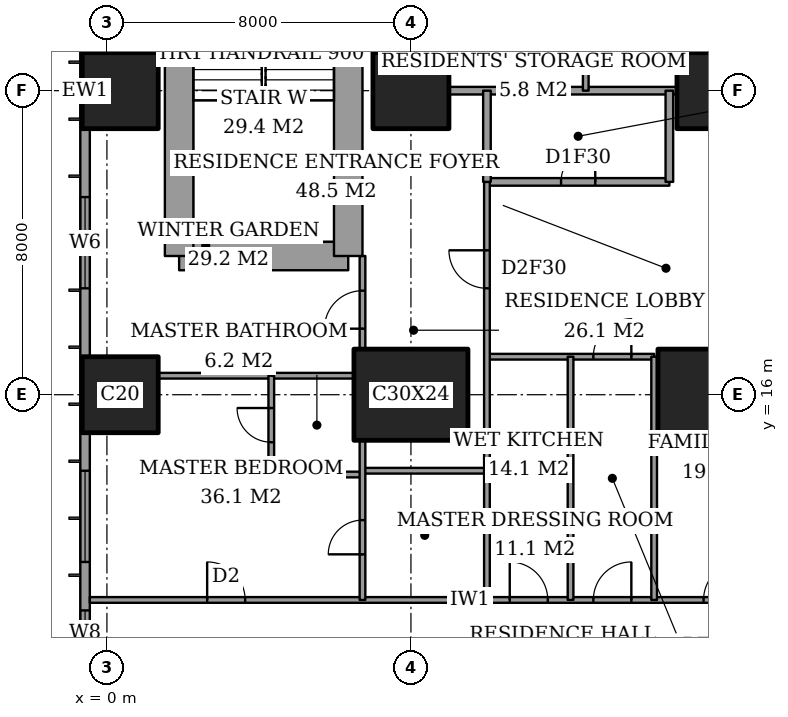
"""IFC4 building model, lengths in metres.
Left out: names, types, materials, properties, quantities, classifications, styles, units other than length and angle.
Written with IfcOpenShell. Run it as: python <this file> out.ifc"""

import sys

from ifc_helpers import new_model, si_unit, direction, frame, frame_2d, origin, origin_2d, place, context, subcontext, project, spatial, rectangle, extrude, element, fill, save


model = new_model("IFC4")
c1 = context("Model", 3, precision=1e-05, world=origin(), true_north=direction((0.0, 1.0)))
c2 = subcontext(c1, "Body", "Model", "MODEL_VIEW")
j1 = project(units=[si_unit("LENGTHUNIT", "METRE"), si_unit("PLANEANGLEUNIT", "RADIAN")], contexts=[c1])
p1 = place(None, origin())
s1 = spatial("IfcSite", under=j1, at=p1, CompositionType="ELEMENT")
p2 = place(p1, origin())
s2 = spatial("IfcBuilding", under=s1, at=p2, CompositionType="ELEMENT")
p3 = place(p2, frame((0.0, 0.0, 36.8)))
s3 = spatial("IfcBuildingStorey", under=s2, at=p3, CompositionType="ELEMENT", Elevation=36.8)
for number, where, z_axis, x_axis in (
    (1, (0.35, 16.0, 0.0), (0.0, 0.0, 1.0), (1.0, 0.0, 0.0)),
    (2, (0.35, 24.0, 0.0), (0.0, 0.0, 1.0), (1.0, 0.0, 0.0)),
):
    element("IfcColumn", number, at=place(p3, frame(where, z_axis=z_axis, x_axis=x_axis)), inside=s3, PredefinedType="COLUMN", context=c2, shape_type="SweptSolid", body=[
        extrude(rectangle(XDim=2.0, YDim=2.0, at=origin_2d()), origin(), (0.0, 0.0, 1.0), 3.6),
    ])
p4 = place(p3, frame((8.0, 16.0, 0.0), z_axis=(0.0, 0.0, 1.0), x_axis=(1.0, 0.0, 0.0)))
e3 = element("IfcColumn", 3, at=p4, inside=s3, PredefinedType="COLUMN", context=c2, shape_type="SweptSolid", body=[
    extrude(rectangle(XDim=3.0, YDim=2.4, at=origin_2d()), origin(), (0.0, 0.0, 1.0), 3.6),
])
p5 = place(p3, frame((8.0, 24.0, 0.0), z_axis=(0.0, 0.0, 1.0), x_axis=(1.0, 0.0, 0.0)))
e4 = element("IfcColumn", 4, at=p5, inside=s3, PredefinedType="COLUMN", context=c2, shape_type="SweptSolid", body=[
    extrude(rectangle(XDim=2.0, YDim=2.0, at=origin_2d()), origin(), (0.0, 0.0, 1.0), 3.6),
])
p6 = place(p3, frame((16.0, 16.0, 0.0), z_axis=(0.0, 0.0, 1.0), x_axis=(1.0, 0.0, 0.0)))
e5 = element("IfcColumn", 5, at=p6, inside=s3, PredefinedType="COLUMN", context=c2, shape_type="SweptSolid", body=[
    extrude(rectangle(XDim=3.0, YDim=2.4, at=origin_2d()), origin(), (0.0, 0.0, 1.0), 3.6),
])
p7 = place(p3, frame((16.0, 24.0, 0.0), z_axis=(0.0, 0.0, 1.0), x_axis=(1.0, 0.0, 0.0)))
e6 = element("IfcColumn", 6, at=p7, inside=s3, PredefinedType="COLUMN", context=c2, shape_type="SweptSolid", body=[
    extrude(rectangle(XDim=2.0, YDim=2.0, at=origin_2d()), origin(), (0.0, 0.0, 1.0), 3.6),
])
p8 = place(p3, frame((1.9, 19.65, 0.0), z_axis=(0.0, 0.0, 1.0), x_axis=(1.0, 0.0, 0.0)))
e7 = element("IfcWall", 7, at=p8, inside=s3, PredefinedType="SHEAR", context=c2, shape_type="SweptSolid", body=[
    extrude(rectangle(XDim=4.45, YDim=0.75, at=frame_2d((2.225, 0.0))), origin(), (0.0, 0.0, 1.0), 3.6),
])
p9 = place(p3, frame((6.35, 19.65, 0.0), z_axis=(0.0, 0.0, 1.0), x_axis=(0.0, 1.0, 0.0)))
e8 = element("IfcWall", 8, at=p9, inside=s3, PredefinedType="SHEAR", context=c2, shape_type="SweptSolid", body=[
    extrude(rectangle(XDim=8.7, YDim=0.75, at=frame_2d((4.35, 0.0))), origin(), (0.0, 0.0, 1.0), 3.6),
])
p10 = place(p9, frame((6.725, 0.0, 0.0)))
e9 = element("IfcOpeningElement", 9, at=p10, cuts=e8, PredefinedType="OPENING", context=c2, shape_type="SweptSolid", body=[
    extrude(rectangle(XDim=1.0, YDim=2.1, at=frame_2d((0.5, 1.05))), frame((0.0, 0.385, 0.0), z_axis=(0.0, -1.0, 0.0), x_axis=(1.0, 0.0, 0.0)), (0.0, 0.0, 1.0), 0.77),
])
p11 = place(p3, frame((1.9, 28.35, 0.0), z_axis=(0.0, 0.0, 1.0), x_axis=(0.0, -1.0, 0.0)))
e10 = element("IfcWall", 10, at=p11, inside=s3, PredefinedType="SHEAR", context=c2, shape_type="SweptSolid", body=[
    extrude(rectangle(XDim=8.7, YDim=0.75, at=frame_2d((4.35, 0.0))), origin(), (0.0, 0.0, 1.0), 3.6),
])
p12 = place(p3, frame((-0.575, 44.825, 0.0), z_axis=(0.0, 0.0, 1.0), x_axis=(0.0, -1.0, 0.0)))
e11 = element("IfcWall", 11, at=p12, inside=s3, PredefinedType="SOLIDWALL", context=c2, shape_type="SweptSolid", body=[
    extrude(rectangle(XDim=41.65, YDim=0.25, at=frame_2d((20.825, 0.0))), origin(), (0.0, 0.0, 1.0), 3.6),
])
p13 = place(p12, frame((0.775, 0.0, 0.6)))
e12 = element("IfcOpeningElement", 12, at=p13, cuts=e11, PredefinedType="OPENING", context=c2, shape_type="SweptSolid", body=[
    extrude(rectangle(XDim=2.4, YDim=2.0, at=frame_2d((1.2, 1.0))), frame((0.0, 0.135, 0.0), z_axis=(0.0, -1.0, 0.0), x_axis=(1.0, 0.0, 0.0)), (0.0, 0.0, 1.0), 0.27),
])
p14 = place(p12, frame((6.1, 0.0, 0.6)))
e13 = element("IfcOpeningElement", 13, at=p14, cuts=e11, PredefinedType="OPENING", context=c2, shape_type="SweptSolid", body=[
    extrude(rectangle(XDim=1.2, YDim=2.0, at=frame_2d((0.6, 1.0))), frame((0.0, 0.135, 0.0), z_axis=(0.0, -1.0, 0.0), x_axis=(1.0, 0.0, 0.0)), (0.0, 0.0, 1.0), 0.27),
])
p15 = place(p12, frame((8.425, 0.0, 0.6)))
e14 = element("IfcOpeningElement", 14, at=p15, cuts=e11, PredefinedType="OPENING", context=c2, shape_type="SweptSolid", body=[
    extrude(rectangle(XDim=2.4, YDim=2.0, at=frame_2d((1.2, 1.0))), frame((0.0, 0.135, 0.0), z_axis=(0.0, -1.0, 0.0), x_axis=(1.0, 0.0, 0.0)), (0.0, 0.0, 1.0), 0.27),
])
p16 = place(p12, frame((15.625, 0.0, 0.6)))
e15 = element("IfcOpeningElement", 15, at=p16, cuts=e11, PredefinedType="OPENING", context=c2, shape_type="SweptSolid", body=[
    extrude(rectangle(XDim=2.4, YDim=2.0, at=frame_2d((1.2, 1.0))), frame((0.0, 0.135, 0.0), z_axis=(0.0, -1.0, 0.0), x_axis=(1.0, 0.0, 0.0)), (0.0, 0.0, 1.0), 0.27),
])
p17 = place(p12, frame((23.625, 0.0, 0.6)))
e16 = element("IfcOpeningElement", 16, at=p17, cuts=e11, PredefinedType="OPENING", context=c2, shape_type="SweptSolid", body=[
    extrude(rectangle(XDim=2.4, YDim=2.0, at=frame_2d((1.2, 1.0))), frame((0.0, 0.135, 0.0), z_axis=(0.0, -1.0, 0.0), x_axis=(1.0, 0.0, 0.0)), (0.0, 0.0, 1.0), 0.27),
])
p18 = place(p12, frame((30.825, 0.0, 0.6)))
e17 = element("IfcOpeningElement", 17, at=p18, cuts=e11, PredefinedType="OPENING", context=c2, shape_type="SweptSolid", body=[
    extrude(rectangle(XDim=2.4, YDim=2.0, at=frame_2d((1.2, 1.0))), frame((0.0, 0.135, 0.0), z_axis=(0.0, -1.0, 0.0), x_axis=(1.0, 0.0, 0.0)), (0.0, 0.0, 1.0), 0.27),
])
p19 = place(p12, frame((34.5, 0.0, 0.6)))
e18 = element("IfcOpeningElement", 18, at=p19, cuts=e11, PredefinedType="OPENING", context=c2, shape_type="SweptSolid", body=[
    extrude(rectangle(XDim=1.2, YDim=2.0, at=frame_2d((0.6, 1.0))), frame((0.0, 0.135, 0.0), z_axis=(0.0, -1.0, 0.0), x_axis=(1.0, 0.0, 0.0)), (0.0, 0.0, 1.0), 0.27),
])
p20 = place(p12, frame((38.475, 0.0, 0.6)))
e19 = element("IfcOpeningElement", 19, at=p20, cuts=e11, PredefinedType="OPENING", context=c2, shape_type="SweptSolid", body=[
    extrude(rectangle(XDim=2.4, YDim=2.0, at=frame_2d((1.2, 1.0))), frame((0.0, 0.135, 0.0), z_axis=(0.0, -1.0, 0.0), x_axis=(1.0, 0.0, 0.0)), (0.0, 0.0, 1.0), 0.27),
])
p21 = place(p3, frame((-0.45, 10.6, 0.0), z_axis=(0.0, 0.0, 1.0), x_axis=(1.0, 0.0, 0.0)))
e20 = element("IfcWall", 20, at=p21, inside=s3, PredefinedType="PARTITIONING", context=c2, shape_type="SweptSolid", body=[
    extrude(rectangle(XDim=25.011, YDim=0.15, at=frame_2d((12.505, 0.0))), origin(), (0.0, 0.0, 1.0), 3.35),
])
p22 = place(p21, frame((13.25, 0.0, 0.0)))
e21 = element("IfcOpeningElement", 21, at=p22, cuts=e20, PredefinedType="OPENING", context=c2, shape_type="SweptSolid", body=[
    extrude(rectangle(XDim=1.0, YDim=2.1, at=frame_2d((0.5, 1.05))), frame((0.0, 0.085, 0.0), z_axis=(0.0, -1.0, 0.0), x_axis=(1.0, 0.0, 0.0)), (0.0, 0.0, 1.0), 0.17),
])
p23 = place(p21, frame((3.087, 0.0, 0.0)))
e22 = element("IfcOpeningElement", 22, at=p23, cuts=e20, PredefinedType="OPENING", context=c2, shape_type="SweptSolid", body=[
    extrude(rectangle(XDim=1.0, YDim=2.1, at=frame_2d((0.5, 1.05))), frame((0.0, 0.085, 0.0), z_axis=(0.0, -1.0, 0.0), x_axis=(1.0, 0.0, 0.0)), (0.0, 0.0, 1.0), 0.17),
])
p24 = place(p21, frame((11.05, 0.0, 0.0)))
e23 = element("IfcOpeningElement", 23, at=p24, cuts=e20, PredefinedType="OPENING", context=c2, shape_type="SweptSolid", body=[
    extrude(rectangle(XDim=1.0, YDim=2.1, at=frame_2d((0.5, 1.05))), frame((0.0, 0.085, 0.0), z_axis=(0.0, -1.0, 0.0), x_axis=(1.0, 0.0, 0.0)), (0.0, 0.0, 1.0), 0.17),
])
p25 = place(p21, frame((16.15, 0.0, 0.0)))
e24 = element("IfcOpeningElement", 24, at=p25, cuts=e20, PredefinedType="OPENING", context=c2, shape_type="SweptSolid", body=[
    extrude(rectangle(XDim=1.0, YDim=2.1, at=frame_2d((0.5, 1.05))), frame((0.0, 0.085, 0.0), z_axis=(0.0, -1.0, 0.0), x_axis=(1.0, 0.0, 0.0)), (0.0, 0.0, 1.0), 0.17),
])
p26 = place(p21, frame((21.175, 0.0, 0.0)))
e25 = element("IfcOpeningElement", 25, at=p26, cuts=e20, PredefinedType="OPENING", context=c2, shape_type="SweptSolid", body=[
    extrude(rectangle(XDim=1.0, YDim=2.1, at=frame_2d((0.5, 1.05))), frame((0.0, 0.085, 0.0), z_axis=(0.0, -1.0, 0.0), x_axis=(1.0, 0.0, 0.0)), (0.0, 0.0, 1.0), 0.17),
])
p27 = place(p3, frame((4.325, 13.9, 0.0), z_axis=(0.0, 0.0, 1.0), x_axis=(1.0, 0.0, 0.0)))
e26 = element("IfcWall", 26, at=p27, inside=s3, PredefinedType="PARTITIONING", context=c2, shape_type="SweptSolid", body=[
    extrude(rectangle(XDim=2.4, YDim=0.15, at=frame_2d((1.2, 0.0))), origin(), (0.0, 0.0, 1.0), 3.35),
])
p28 = place(p3, frame((6.725, 14.0, 0.0), z_axis=(0.0, 0.0, 1.0), x_axis=(1.0, 0.0, 0.0)))
e27 = element("IfcWall", 27, at=p28, inside=s3, PredefinedType="PARTITIONING", context=c2, shape_type="SweptSolid", body=[
    extrude(rectangle(XDim=3.275, YDim=0.15, at=frame_2d((1.637, 0.0))), origin(), (0.0, 0.0, 1.0), 3.35),
])
p29 = place(p3, frame((1.35, 16.5, 0.0), z_axis=(0.0, 0.0, 1.0), x_axis=(1.0, 0.0, 0.0)))
e28 = element("IfcWall", 28, at=p29, inside=s3, PredefinedType="PARTITIONING", context=c2, shape_type="SweptSolid", body=[
    extrude(rectangle(XDim=5.15, YDim=0.15, at=frame_2d((2.575, 0.0))), origin(), (0.0, 0.0, 1.0), 3.35),
])
p30 = place(p3, frame((10.0, 17.0, 0.0), z_axis=(0.0, 0.0, 1.0), x_axis=(1.0, 0.0, 0.0)))
e29 = element("IfcWall", 29, at=p30, inside=s3, PredefinedType="PARTITIONING", context=c2, shape_type="SweptSolid", body=[
    extrude(rectangle(XDim=4.4, YDim=0.15, at=frame_2d((2.2, 0.0))), origin(), (0.0, 0.0, 1.0), 3.35),
])
p31 = place(p30, frame((2.8, 0.0, 0.0)))
e30 = element("IfcOpeningElement", 30, at=p31, cuts=e29, PredefinedType="OPENING", context=c2, shape_type="SweptSolid", body=[
    extrude(rectangle(XDim=1.0, YDim=2.1, at=frame_2d((0.5, 1.05))), frame((0.0, 0.085, 0.0), z_axis=(0.0, -1.0, 0.0), x_axis=(1.0, 0.0, 0.0)), (0.0, 0.0, 1.0), 0.17),
])
p32 = place(p3, frame((10.0, 21.6, 0.0), z_axis=(0.0, 0.0, 1.0), x_axis=(1.0, 0.0, 0.0)))
e31 = element("IfcWall", 31, at=p32, inside=s3, PredefinedType="PARTITIONING", context=c2, shape_type="SweptSolid", body=[
    extrude(rectangle(XDim=4.8, YDim=0.2, at=frame_2d((2.4, 0.0))), origin(), (0.0, 0.0, 1.0), 3.35),
])
p33 = place(p32, frame((1.95, 0.0, 0.0)))
e32 = element("IfcOpeningElement", 32, at=p33, cuts=e31, PredefinedType="OPENING", context=c2, shape_type="SweptSolid", body=[
    extrude(rectangle(XDim=0.9, YDim=2.1, at=frame_2d((0.45, 1.05))), frame((0.0, 0.11, 0.0), z_axis=(0.0, -1.0, 0.0), x_axis=(1.0, 0.0, 0.0)), (0.0, 0.0, 1.0), 0.22),
])
p34 = place(p3, frame((9.0, 24.0, 0.0), z_axis=(0.0, 0.0, 1.0), x_axis=(1.0, 0.0, 0.0)))
e33 = element("IfcWall", 33, at=p34, inside=s3, PredefinedType="PARTITIONING", context=c2, shape_type="SweptSolid", body=[
    extrude(rectangle(XDim=6.0, YDim=0.2, at=frame_2d((3.0, 0.0))), origin(), (0.0, 0.0, 1.0), 3.35),
])
p35 = place(p3, frame((4.325, 13.9, 0.0), z_axis=(0.0, 0.0, 1.0), x_axis=(0.0, 1.0, 0.0)))
e34 = element("IfcWall", 34, at=p35, inside=s3, PredefinedType="PARTITIONING", context=c2, shape_type="SweptSolid", body=[
    extrude(rectangle(XDim=2.6, YDim=0.15, at=frame_2d((1.3, 0.0))), origin(), (0.0, 0.0, 1.0), 3.35),
])
p36 = place(p35, frame((0.85, 0.0, 0.0)))
e35 = element("IfcOpeningElement", 35, at=p36, cuts=e34, PredefinedType="OPENING", context=c2, shape_type="SweptSolid", body=[
    extrude(rectangle(XDim=0.9, YDim=2.1, at=frame_2d((0.45, 1.05))), frame((0.0, 0.085, 0.0), z_axis=(0.0, -1.0, 0.0), x_axis=(1.0, 0.0, 0.0)), (0.0, 0.0, 1.0), 0.17),
])
p37 = place(p3, frame((6.725, 10.6, 0.0), z_axis=(0.0, 0.0, 1.0), x_axis=(0.0, 1.0, 0.0)))
e36 = element("IfcWall", 36, at=p37, inside=s3, PredefinedType="PARTITIONING", context=c2, shape_type="SweptSolid", body=[
    extrude(rectangle(XDim=4.2, YDim=0.15, at=frame_2d((2.1, 0.0))), origin(), (0.0, 0.0, 1.0), 3.35),
])
p38 = place(p37, frame((1.2, 0.0, 0.0)))
e37 = element("IfcOpeningElement", 37, at=p38, cuts=e36, PredefinedType="OPENING", context=c2, shape_type="SweptSolid", body=[
    extrude(rectangle(XDim=0.9, YDim=2.1, at=frame_2d((0.45, 1.05))), frame((0.0, 0.085, 0.0), z_axis=(0.0, -1.0, 0.0), x_axis=(1.0, 0.0, 0.0)), (0.0, 0.0, 1.0), 0.17),
])
p39 = place(p3, frame((6.725, 17.2, 0.0), z_axis=(0.0, 0.0, 1.0), x_axis=(0.0, 1.0, 0.0)))
e38 = element("IfcWall", 38, at=p39, inside=s3, PredefinedType="PARTITIONING", context=c2, shape_type="SweptSolid", body=[
    extrude(rectangle(XDim=2.45, YDim=0.15, at=frame_2d((1.225, 0.0))), origin(), (0.0, 0.0, 1.0), 3.35),
])
p40 = place(p39, frame((0.538, 0.0, 0.0)))
e39 = element("IfcOpeningElement", 39, at=p40, cuts=e38, PredefinedType="OPENING", context=c2, shape_type="SweptSolid", body=[
    extrude(rectangle(XDim=1.0, YDim=2.1, at=frame_2d((0.5, 1.05))), frame((0.0, 0.085, 0.0), z_axis=(0.0, -1.0, 0.0), x_axis=(1.0, 0.0, 0.0)), (0.0, 0.0, 1.0), 0.17),
])
p41 = place(p3, frame((10.0, 21.6, 0.0), z_axis=(0.0, 0.0, 1.0), x_axis=(0.0, 1.0, 0.0)))
e40 = element("IfcWall", 40, at=p41, inside=s3, PredefinedType="PARTITIONING", context=c2, shape_type="SweptSolid", body=[
    extrude(rectangle(XDim=2.4, YDim=0.2, at=frame_2d((1.2, 0.0))), origin(), (0.0, 0.0, 1.0), 3.35),
])
p42 = place(p3, frame((10.0, 10.6, 0.0), z_axis=(0.0, 0.0, 1.0), x_axis=(0.0, 1.0, 0.0)))
e41 = element("IfcWall", 41, at=p42, inside=s3, PredefinedType="PARTITIONING", context=c2, shape_type="SweptSolid", body=[
    extrude(rectangle(XDim=11.0, YDim=0.15, at=frame_2d((5.5, 0.0))), origin(), (0.0, 0.0, 1.0), 3.35),
])
p43 = place(p42, frame((8.2, 0.0, 0.0)))
e42 = element("IfcOpeningElement", 42, at=p43, cuts=e41, PredefinedType="OPENING", context=c2, shape_type="SweptSolid", body=[
    extrude(rectangle(XDim=1.0, YDim=2.1, at=frame_2d((0.5, 1.05))), frame((0.0, 0.085, 0.0), z_axis=(0.0, -1.0, 0.0), x_axis=(1.0, 0.0, 0.0)), (0.0, 0.0, 1.0), 0.17),
])
p44 = place(p3, frame((12.2, 10.6, 0.0), z_axis=(0.0, 0.0, 1.0), x_axis=(0.0, 1.0, 0.0)))
e43 = element("IfcWall", 43, at=p44, inside=s3, PredefinedType="PARTITIONING", context=c2, shape_type="SweptSolid", body=[
    extrude(rectangle(XDim=6.4, YDim=0.15, at=frame_2d((3.2, 0.0))), origin(), (0.0, 0.0, 1.0), 3.35),
])
p45 = place(p3, frame((12.6, 24.0, 0.0), z_axis=(0.0, 0.0, 1.0), x_axis=(0.0, 1.0, 0.0)))
e44 = element("IfcWall", 44, at=p45, inside=s3, PredefinedType="PARTITIONING", context=c2, shape_type="SweptSolid", body=[
    extrude(rectangle(XDim=1.6, YDim=0.15, at=frame_2d((0.8, 0.0))), origin(), (0.0, 0.0, 1.0), 3.35),
])
p46 = place(p3, frame((14.4, 10.6, 0.0), z_axis=(0.0, 0.0, 1.0), x_axis=(0.0, 1.0, 0.0)))
e45 = element("IfcWall", 45, at=p46, inside=s3, PredefinedType="PARTITIONING", context=c2, shape_type="SweptSolid", body=[
    extrude(rectangle(XDim=6.4, YDim=0.15, at=frame_2d((3.2, 0.0))), origin(), (0.0, 0.0, 1.0), 3.35),
])
p47 = place(p3, frame((14.8, 21.6, 0.0), z_axis=(0.0, 0.0, 1.0), x_axis=(0.0, 1.0, 0.0)))
e46 = element("IfcWall", 46, at=p47, inside=s3, PredefinedType="PARTITIONING", context=c2, shape_type="SweptSolid", body=[
    extrude(rectangle(XDim=2.4, YDim=0.2, at=frame_2d((1.2, 0.0))), origin(), (0.0, 0.0, 1.0), 3.35),
])
p48 = place(p17, origin())
e47 = element("IfcWindow", 47, at=p48, inside=s3, PartitioningType="SINGLE_PANEL", PredefinedType="WINDOW", context=c2, shape_type="SweptSolid", body=[
    extrude(rectangle(XDim=2.4, YDim=2.0, at=frame_2d((1.2, 1.0))), frame((0.0, 0.03, 0.0), z_axis=(0.0, -1.0, 0.0), x_axis=(1.0, 0.0, 0.0)), (0.0, 0.0, 1.0), 0.06),
])
fill(e16, e47)
p49 = place(p18, origin())
e48 = element("IfcWindow", 48, at=p49, inside=s3, PartitioningType="SINGLE_PANEL", PredefinedType="WINDOW", context=c2, shape_type="SweptSolid", body=[
    extrude(rectangle(XDim=2.4, YDim=2.0, at=frame_2d((1.2, 1.0))), frame((0.0, 0.03, 0.0), z_axis=(0.0, -1.0, 0.0), x_axis=(1.0, 0.0, 0.0)), (0.0, 0.0, 1.0), 0.06),
])
fill(e17, e48)
p50 = place(p19, origin())
e49 = element("IfcWindow", 49, at=p50, inside=s3, PartitioningType="SINGLE_PANEL", PredefinedType="WINDOW", context=c2, shape_type="SweptSolid", body=[
    extrude(rectangle(XDim=1.2, YDim=2.0, at=frame_2d((0.6, 1.0))), frame((0.0, 0.03, 0.0), z_axis=(0.0, -1.0, 0.0), x_axis=(1.0, 0.0, 0.0)), (0.0, 0.0, 1.0), 0.06),
])
fill(e18, e49)
p51 = place(p22, origin())
e50 = element("IfcDoor", 50, at=p51, inside=s3, OperationType="SINGLE_SWING_LEFT", PredefinedType="DOOR", context=c2, shape_type="SweptSolid", body=[
    extrude(rectangle(XDim=1.0, YDim=2.1, at=frame_2d((0.5, 1.05))), frame((0.0, 0.025, 0.0), z_axis=(0.0, -1.0, 0.0), x_axis=(1.0, 0.0, 0.0)), (0.0, 0.0, 1.0), 0.05),
])
fill(e21, e50)
p52 = place(p36, origin())
e51 = element("IfcDoor", 51, at=p52, inside=s3, OperationType="SINGLE_SWING_LEFT", PredefinedType="DOOR", context=c2, shape_type="SweptSolid", body=[
    extrude(rectangle(XDim=0.9, YDim=2.1, at=frame_2d((0.45, 1.05))), frame((0.0, 0.025, 0.0), z_axis=(0.0, -1.0, 0.0), x_axis=(1.0, 0.0, 0.0)), (0.0, 0.0, 1.0), 0.05),
])
fill(e35, e51)
p53 = place(p23, origin())
e52 = element("IfcDoor", 52, at=p53, inside=s3, OperationType="SINGLE_SWING_RIGHT", PredefinedType="DOOR", context=c2, shape_type="SweptSolid", body=[
    extrude(rectangle(XDim=1.0, YDim=2.1, at=frame_2d((0.5, 1.05))), frame((0.0, 0.025, 0.0), z_axis=(0.0, -1.0, 0.0), x_axis=(1.0, 0.0, 0.0)), (0.0, 0.0, 1.0), 0.05),
])
fill(e22, e52)
p54 = place(p40, origin())
e53 = element("IfcDoor", 53, at=p54, inside=s3, OperationType="SINGLE_SWING_RIGHT", PredefinedType="DOOR", context=c2, shape_type="SweptSolid", body=[
    extrude(rectangle(XDim=1.0, YDim=2.1, at=frame_2d((0.5, 1.05))), frame((0.0, 0.025, 0.0), z_axis=(0.0, -1.0, 0.0), x_axis=(1.0, 0.0, 0.0)), (0.0, 0.0, 1.0), 0.05),
])
fill(e39, e53)
p55 = place(p38, origin())
e54 = element("IfcDoor", 54, at=p55, inside=s3, OperationType="SINGLE_SWING_RIGHT", PredefinedType="DOOR", context=c2, shape_type="SweptSolid", body=[
    extrude(rectangle(XDim=0.9, YDim=2.1, at=frame_2d((0.45, 1.05))), frame((0.0, 0.025, 0.0), z_axis=(0.0, -1.0, 0.0), x_axis=(1.0, 0.0, 0.0)), (0.0, 0.0, 1.0), 0.05),
])
fill(e37, e54)
p56 = place(p43, origin())
e55 = element("IfcDoor", 55, at=p56, inside=s3, OperationType="SINGLE_SWING_LEFT", PredefinedType="DOOR", context=c2, shape_type="SweptSolid", body=[
    extrude(rectangle(XDim=1.0, YDim=2.1, at=frame_2d((0.5, 1.05))), frame((0.0, 0.025, 0.0), z_axis=(0.0, -1.0, 0.0), x_axis=(1.0, 0.0, 0.0)), (0.0, 0.0, 1.0), 0.05),
])
fill(e42, e55)
p57 = place(p33, origin())
e56 = element("IfcDoor", 56, at=p57, inside=s3, OperationType="SINGLE_SWING_LEFT", PredefinedType="DOOR", context=c2, shape_type="SweptSolid", body=[
    extrude(rectangle(XDim=0.9, YDim=2.1, at=frame_2d((0.45, 1.05))), frame((0.0, 0.025, 0.0), z_axis=(0.0, -1.0, 0.0), x_axis=(1.0, 0.0, 0.0)), (0.0, 0.0, 1.0), 0.05),
])
fill(e32, e56)
p58 = place(p24, origin())
e57 = element("IfcDoor", 57, at=p58, inside=s3, OperationType="SINGLE_SWING_RIGHT", PredefinedType="DOOR", context=c2, shape_type="SweptSolid", body=[
    extrude(rectangle(XDim=1.0, YDim=2.1, at=frame_2d((0.5, 1.05))), frame((0.0, 0.025, 0.0), z_axis=(0.0, -1.0, 0.0), x_axis=(1.0, 0.0, 0.0)), (0.0, 0.0, 1.0), 0.05),
])
fill(e23, e57)
p59 = place(p31, origin())
e58 = element("IfcDoor", 58, at=p59, inside=s3, OperationType="SINGLE_SWING_LEFT", PredefinedType="DOOR", context=c2, shape_type="SweptSolid", body=[
    extrude(rectangle(XDim=1.0, YDim=2.1, at=frame_2d((0.5, 1.05))), frame((0.0, 0.025, 0.0), z_axis=(0.0, -1.0, 0.0), x_axis=(1.0, 0.0, 0.0)), (0.0, 0.0, 1.0), 0.05),
])
fill(e30, e58)
p60 = place(p25, origin())
e59 = element("IfcDoor", 59, at=p60, inside=s3, OperationType="SINGLE_SWING_LEFT", PredefinedType="DOOR", context=c2, shape_type="SweptSolid", body=[
    extrude(rectangle(XDim=1.0, YDim=2.1, at=frame_2d((0.5, 1.05))), frame((0.0, 0.025, 0.0), z_axis=(0.0, -1.0, 0.0), x_axis=(1.0, 0.0, 0.0)), (0.0, 0.0, 1.0), 0.05),
])
fill(e24, e59)
save(model, sys.argv[1])
